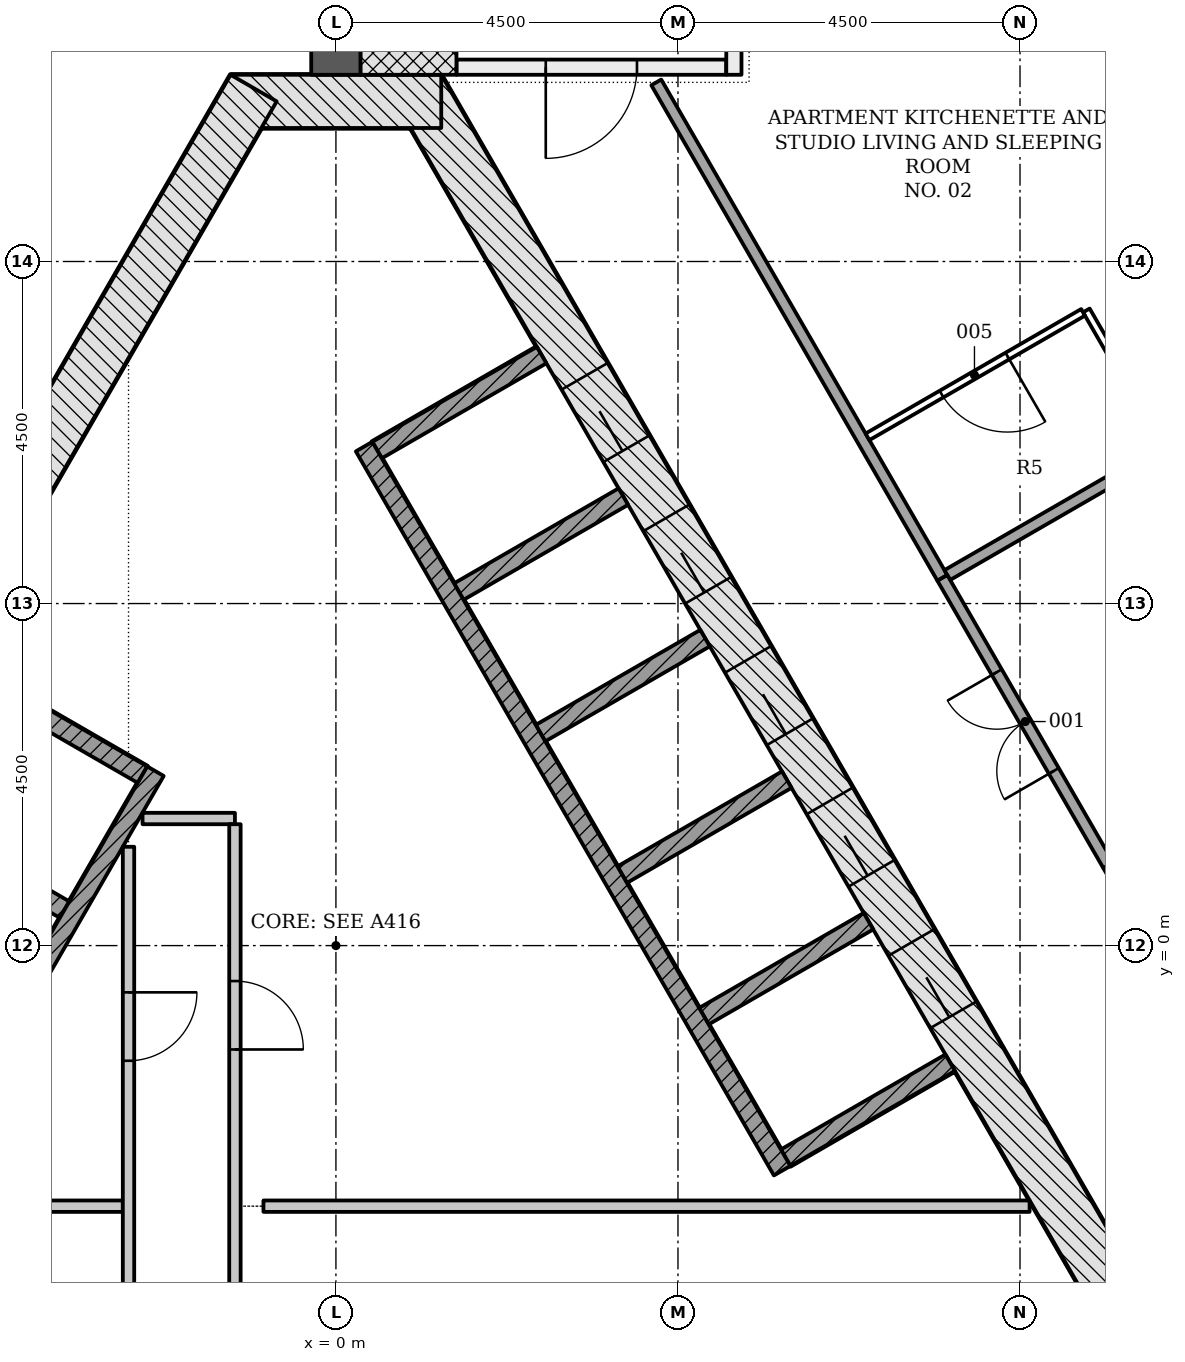
"""IFC4 building model, lengths in metres.
Left out: names, types, materials, properties, quantities, classifications, styles, units other than length and angle.
Written with IfcOpenShell. Run it as: python <this file> out.ifc"""

import sys

from ifc_helpers import new_model, si_unit, direction, frame, frame_2d, origin, place, context, subcontext, project, spatial, rectangle, extrude, element, fill, save


model = new_model("IFC4")
c1 = context("Model", 3, precision=1e-05, world=origin(), true_north=direction((0.0, 1.0)))
c2 = subcontext(c1, "Body", "Model", "MODEL_VIEW")
j1 = project(units=[si_unit("LENGTHUNIT", "METRE"), si_unit("PLANEANGLEUNIT", "RADIAN")], contexts=[c1])
p1 = place(None, origin())
s1 = spatial("IfcSite", under=j1, at=p1, CompositionType="ELEMENT")
p2 = place(p1, origin())
s2 = spatial("IfcBuilding", under=s1, at=p2, CompositionType="ELEMENT")
p3 = place(p2, frame((0.0, 0.0, 214.8)))
s3 = spatial("IfcBuildingStorey", under=s2, at=p3, CompositionType="ELEMENT", Elevation=214.8)
p4 = place(p3, frame((8.926, -6.753, -0.2), z_axis=(0.0, 0.0, 1.0), x_axis=(0.500042739161, 0.866000726912, 0.0)))
e1 = element("IfcWall", 1, at=p4, inside=s3, PredefinedType="SHEAR", context=c2, shape_type="SweptSolid", body=[
    extrude(rectangle(XDim=2.771, YDim=0.7, at=frame_2d((1.386, 0.0))), origin(), (0.0, 0.0, 1.0), 3.6),
])
p5 = place(p3, frame((10.311, -4.703, -0.2), z_axis=(0.0, 0.0, 1.0), x_axis=(-0.500001446645, 0.866024568562, 0.0)))
e2 = element("IfcWall", 2, at=p5, inside=s3, PredefinedType="SHEAR", context=c2, shape_type="SweptSolid", body=[
    extrude(rectangle(XDim=18.458, YDim=0.7, at=frame_2d((9.229, 0.0))), origin(), (0.0, 0.0, 1.0), 3.6),
])
p6 = place(p5, frame((4.379, 0.0, 0.2)))
e3 = element("IfcOpeningElement", 3, at=p6, cuts=e2, PredefinedType="OPENING", context=c2, shape_type="SweptSolid", body=[
    extrude(rectangle(XDim=1.1, YDim=2.1, at=frame_2d((0.55, 1.05))), frame((0.0, 0.36, 0.0), z_axis=(0.0, -1.0, 0.0), x_axis=(1.0, 0.0, 0.0)), (0.0, 0.0, 1.0), 0.72),
])
p7 = place(p5, frame((6.529, 0.0, 0.2)))
e4 = element("IfcOpeningElement", 4, at=p7, cuts=e2, PredefinedType="OPENING", context=c2, shape_type="SweptSolid", body=[
    extrude(rectangle(XDim=1.1, YDim=2.1, at=frame_2d((0.55, 1.05))), frame((0.0, 0.36, 0.0), z_axis=(0.0, -1.0, 0.0), x_axis=(1.0, 0.0, 0.0)), (0.0, 0.0, 1.0), 0.72),
])
p8 = place(p5, frame((8.679, 0.0, 0.2)))
e5 = element("IfcOpeningElement", 5, at=p8, cuts=e2, PredefinedType="OPENING", context=c2, shape_type="SweptSolid", body=[
    extrude(rectangle(XDim=1.1, YDim=2.1, at=frame_2d((0.55, 1.05))), frame((0.0, 0.36, 0.0), z_axis=(0.0, -1.0, 0.0), x_axis=(1.0, 0.0, 0.0)), (0.0, 0.0, 1.0), 0.72),
])
p9 = place(p5, frame((10.829, 0.0, 0.2)))
e6 = element("IfcOpeningElement", 6, at=p9, cuts=e2, PredefinedType="OPENING", context=c2, shape_type="SweptSolid", body=[
    extrude(rectangle(XDim=1.1, YDim=2.1, at=frame_2d((0.55, 1.05))), frame((0.0, 0.36, 0.0), z_axis=(0.0, -1.0, 0.0), x_axis=(1.0, 0.0, 0.0)), (0.0, 0.0, 1.0), 0.72),
])
p10 = place(p5, frame((12.979, 0.0, 0.2)))
e7 = element("IfcOpeningElement", 7, at=p10, cuts=e2, PredefinedType="OPENING", context=c2, shape_type="SweptSolid", body=[
    extrude(rectangle(XDim=1.1, YDim=2.1, at=frame_2d((0.55, 1.05))), frame((0.0, 0.36, 0.0), z_axis=(0.0, -1.0, 0.0), x_axis=(1.0, 0.0, 0.0)), (0.0, 0.0, 1.0), 0.72),
])
p11 = place(p3, frame((1.386, 11.106, -0.2), z_axis=(0.0, 0.0, 1.0), x_axis=(-1.0, 0.0, 0.0)))
e8 = element("IfcWall", 8, at=p11, inside=s3, PredefinedType="SHEAR", context=c2, shape_type="SweptSolid", body=[
    extrude(rectangle(XDim=2.771, YDim=0.7, at=frame_2d((1.386, 0.0))), origin(), (0.0, 0.0, 1.0), 3.6),
])
p12 = place(p3, frame((-1.083, 11.281, -0.2), z_axis=(0.0, 0.0, 1.0), x_axis=(-0.500001446645, -0.866024568562, 0.0)))
e9 = element("IfcWall", 9, at=p12, inside=s3, PredefinedType="SHEAR", context=c2, shape_type="SweptSolid", body=[
    extrude(rectangle(XDim=18.458, YDim=0.7, at=frame_2d((9.229, 0.0))), origin(), (0.0, 0.0, 1.0), 3.6),
])
p13 = place(p12, frame((8.979, 0.0, 0.2)))
e10 = element("IfcOpeningElement", 10, at=p13, cuts=e9, PredefinedType="OPENING", context=c2, shape_type="SweptSolid", body=[
    extrude(rectangle(XDim=1.2, YDim=2.1, at=frame_2d((0.6, 1.05))), frame((0.0, 0.36, 0.0), z_axis=(0.0, -1.0, 0.0), x_axis=(1.0, 0.0, 0.0)), (0.0, 0.0, 1.0), 0.72),
])
p14 = place(p12, frame((11.029, 0.0, 0.2)))
e11 = element("IfcOpeningElement", 11, at=p14, cuts=e9, PredefinedType="OPENING", context=c2, shape_type="SweptSolid", body=[
    extrude(rectangle(XDim=1.2, YDim=2.1, at=frame_2d((0.6, 1.05))), frame((0.0, 0.36, 0.0), z_axis=(0.0, -1.0, 0.0), x_axis=(1.0, 0.0, 0.0)), (0.0, 0.0, 1.0), 0.72),
])
p15 = place(p3, frame((0.0, 11.456, -0.2), z_axis=(0.0, 0.0, 1.0), x_axis=(0.0, 1.0, 0.0)))
e12 = element("IfcWall", 12, at=p15, inside=s3, PredefinedType="SHEAR", context=c2, shape_type="SweptSolid", body=[
    extrude(rectangle(XDim=8.359, YDim=0.65, at=frame_2d((4.179, 0.0))), origin(), (0.0, 0.0, 1.0), 3.6),
])
for number, where, z_axis, x_axis in (
    (13, (8.081, -1.541, -0.2), (0.0, 0.0, 1.0), (-0.866, -0.5, 0.0)),
    (14, (7.006, 0.321, -0.2), (0.0, 0.0, 1.0), (-0.866, -0.5, 0.0)),
):
    element("IfcWall", number, at=place(p3, frame(where, z_axis=z_axis, x_axis=x_axis)), inside=s3, PredefinedType="PARTITIONING", context=c2, shape_type="SweptSolid", body=[
        extrude(rectangle(XDim=2.5, YDim=0.25, at=frame_2d((1.25, 0.0))), origin(), (0.0, 0.0, 1.0), 3.6),
    ])
p16 = place(p3, frame((5.931, 2.183, -0.2), z_axis=(0.0, 0.0, 1.0), x_axis=(-0.866047370643, -0.499961950354, 0.0)))
e15 = element("IfcWall", 15, at=p16, inside=s3, PredefinedType="PARTITIONING", context=c2, shape_type="SweptSolid", body=[
    extrude(rectangle(XDim=2.5, YDim=0.25, at=frame_2d((1.25, 0.0))), origin(), (0.0, 0.0, 1.0), 3.6),
])
for number, where, z_axis, x_axis in (
    (16, (4.856, 4.045, -0.2), (0.0, 0.0, 1.0), (-0.866, -0.5, 0.0)),
    (17, (3.781, 5.907, -0.2), (0.0, 0.0, 1.0), (-0.866, -0.5, 0.0)),
    (18, (2.706, 7.769, -0.2), (0.0, 0.0, 1.0), (-0.866, -0.5, 0.0)),
):
    element("IfcWall", number, at=place(p3, frame(where, z_axis=z_axis, x_axis=x_axis)), inside=s3, PredefinedType="PARTITIONING", context=c2, shape_type="SweptSolid", body=[
        extrude(rectangle(XDim=2.5, YDim=0.25, at=frame_2d((1.25, 0.0))), origin(), (0.0, 0.0, 1.0), 3.6),
    ])
p17 = place(p3, frame((5.87, -2.961, 0.0), z_axis=(0.0, 0.0, 1.0), x_axis=(-0.50000615651, 0.866021849293, 0.0)))
e19 = element("IfcWall", 19, at=p17, inside=s3, PredefinedType="PARTITIONING", context=c2, shape_type="SweptSolid", body=[
    extrude(rectangle(XDim=11.0, YDim=0.25, at=frame_2d((5.5, 0.0))), origin(), (0.0, 0.0, 1.0), 3.4),
])
for number, where, z_axis, x_axis in (
    (20, (-5.056, 3.699, -0.2), (0.0, 0.0, 1.0), (0.866, -0.5, 0.0)),
    (21, (-6.081, 1.923, -0.2), (0.0, 0.0, 1.0), (0.866, -0.5, 0.0)),
):
    element("IfcWall", number, at=place(p3, frame(where, z_axis=z_axis, x_axis=x_axis)), inside=s3, PredefinedType="PARTITIONING", context=c2, shape_type="SweptSolid", body=[
        extrude(rectangle(XDim=2.9, YDim=0.25, at=frame_2d((1.45, 0.0))), origin(), (0.0, 0.0, 1.0), 3.6),
    ])
p18 = place(p3, frame((-2.374, 2.294, 0.0), z_axis=(0.0, 0.0, 1.0), x_axis=(-0.500003174267, -0.866023571113, 0.0)))
e22 = element("IfcWall", 22, at=p18, inside=s3, PredefinedType="PARTITIONING", context=c2, shape_type="SweptSolid", body=[
    extrude(rectangle(XDim=6.7, YDim=0.25, at=frame_2d((3.35, 0.0))), origin(), (0.0, 0.0, 1.0), 3.4),
])
p19 = place(p3, frame((-5.489, -3.428, 0.0), z_axis=(0.0, 0.0, 1.0), x_axis=(1.0, 0.0, 0.0)))
e23 = element("IfcWall", 23, at=p19, inside=s3, PredefinedType="PARTITIONING", context=c2, shape_type="SweptSolid", body=[
    extrude(rectangle(XDim=2.685, YDim=0.15, at=frame_2d((1.343, 0.0))), origin(), (0.0, 0.0, 1.0), 3.4),
])
p20 = place(p3, frame((-2.729, 1.3, 0.0), z_axis=(0.0, 0.0, 1.0), x_axis=(0.0, -1.0, 0.0)))
e24 = element("IfcWall", 24, at=p20, inside=s3, PredefinedType="PARTITIONING", context=c2, shape_type="SweptSolid", body=[
    extrude(rectangle(XDim=7.528, YDim=0.15, at=frame_2d((3.764, 0.0))), origin(), (0.0, 0.0, 1.0), 3.4),
])
p21 = place(p20, frame((1.915, 0.0, 0.0)))
e25 = element("IfcOpeningElement", 25, at=p21, cuts=e24, PredefinedType="OPENING", context=c2, shape_type="SweptSolid", body=[
    extrude(rectangle(XDim=0.9, YDim=2.1, at=frame_2d((0.45, 1.05))), frame((0.0, 0.085, 0.0), z_axis=(0.0, -1.0, 0.0), x_axis=(1.0, 0.0, 0.0)), (0.0, 0.0, 1.0), 0.17),
])
p22 = place(p3, frame((-2.544, 1.672, 0.0), z_axis=(0.0, 0.0, 1.0), x_axis=(1.0, 0.0, 0.0)))
e26 = element("IfcWall", 26, at=p22, inside=s3, PredefinedType="PARTITIONING", context=c2, shape_type="SweptSolid", body=[
    extrude(rectangle(XDim=1.216, YDim=0.15, at=frame_2d((0.608, 0.0))), origin(), (0.0, 0.0, 1.0), 3.4),
])
p23 = place(p3, frame((-1.329, 1.597, 0.0), z_axis=(0.0, 0.0, 1.0), x_axis=(0.0, -1.0, 0.0)))
e27 = element("IfcWall", 27, at=p23, inside=s3, PredefinedType="PARTITIONING", context=c2, shape_type="SweptSolid", body=[
    extrude(rectangle(XDim=7.825, YDim=0.15, at=frame_2d((3.913, 0.0))), origin(), (0.0, 0.0, 1.0), 3.4),
])
p24 = place(p23, frame((2.063, 0.0, 0.0)))
e28 = element("IfcOpeningElement", 28, at=p24, cuts=e27, PredefinedType="OPENING", context=c2, shape_type="SweptSolid", body=[
    extrude(rectangle(XDim=0.9, YDim=2.1, at=frame_2d((0.45, 1.05))), frame((0.0, 0.085, 0.0), z_axis=(0.0, -1.0, 0.0), x_axis=(1.0, 0.0, 0.0)), (0.0, 0.0, 1.0), 0.17),
])
p25 = place(p3, frame((-0.954, -3.428, 0.0), z_axis=(0.0, 0.0, 1.0), x_axis=(1.0, 0.0, 0.0)))
e29 = element("IfcWall", 29, at=p25, inside=s3, PredefinedType="PARTITIONING", context=c2, shape_type="SweptSolid", body=[
    extrude(rectangle(XDim=10.08, YDim=0.15, at=frame_2d((5.04, 0.0))), origin(), (0.0, 0.0, 1.0), 3.4),
])
p26 = place(p3, frame((5.135, 11.556, -0.2), z_axis=(0.0, 0.0, 1.0), x_axis=(-1.0, 0.0, 0.0)))
e30 = element("IfcWall", 30, at=p26, inside=s3, PredefinedType="SHEAR", context=c2, shape_type="SweptSolid", body=[
    extrude(rectangle(XDim=3.55, YDim=0.2, at=frame_2d((1.775, 0.0))), origin(), (0.0, 0.0, 1.0), 3.6),
])
p27 = place(p26, frame((1.175, 0.0, 0.2)))
e31 = element("IfcOpeningElement", 31, at=p27, cuts=e30, PredefinedType="OPENING", context=c2, shape_type="SweptSolid", body=[
    extrude(rectangle(XDim=1.2, YDim=2.1, at=frame_2d((0.6, 1.05))), frame((0.0, 0.11, 0.0), z_axis=(0.0, -1.0, 0.0), x_axis=(1.0, 0.0, 0.0)), (0.0, 0.0, 1.0), 0.22),
])
p28 = place(p3, frame((5.236, 11.456, -0.2), z_axis=(0.0, 0.0, 1.0), x_axis=(0.0, 1.0, 0.0)))
e32 = element("IfcWall", 32, at=p28, inside=s3, PredefinedType="SHEAR", context=c2, shape_type="SweptSolid", body=[
    extrude(rectangle(XDim=5.6, YDim=0.2, at=frame_2d((2.8, 0.0))), origin(), (0.0, 0.0, 1.0), 3.6),
])
p29 = place(p28, frame((0.45, 0.0, 0.2)))
e33 = element("IfcOpeningElement", 33, at=p29, cuts=e32, PredefinedType="OPENING", context=c2, shape_type="SweptSolid", body=[
    extrude(rectangle(XDim=1.2, YDim=2.1, at=frame_2d((0.6, 1.05))), frame((0.0, 0.11, 0.0), z_axis=(0.0, -1.0, 0.0), x_axis=(1.0, 0.0, 0.0)), (0.0, 0.0, 1.0), 0.22),
])
p30 = place(p3, frame((0.955, 11.456, -0.2), z_axis=(0.0, 0.0, 1.0), x_axis=(0.0, 1.0, 0.0)))
e34 = element("IfcWall", 34, at=p30, inside=s3, PredefinedType="SHEAR", context=c2, shape_type="SweptSolid", body=[
    extrude(rectangle(XDim=7.2, YDim=1.261, at=frame_2d((3.6, 0.0))), origin(), (0.0, 0.0, 1.0), 3.6),
])
p31 = place(p3, frame((15.832, -8.765, 0.0), z_axis=(0.0, 0.0, 1.0), x_axis=(-0.500005035328, 0.866022496617, 0.0)))
e35 = element("IfcWall", 35, at=p31, inside=s3, PredefinedType="PARTITIONING", context=c2, shape_type="SweptSolid", body=[
    extrude(rectangle(XDim=11.343, YDim=0.15, at=frame_2d((5.671, 0.0))), origin(), (0.0, 0.0, 1.0), 2.852),
])
p32 = place(p3, frame((7.979, 4.837, 0.0), z_axis=(0.0, 0.0, 1.0), x_axis=(-0.500014427086, 0.866017074142, 0.0)))
e36 = element("IfcWall", 36, at=p32, inside=s3, PredefinedType="PARTITIONING", context=c2, shape_type="SweptSolid", body=[
    extrude(rectangle(XDim=7.528, YDim=0.15, at=frame_2d((3.764, 0.0))), origin(), (0.0, 0.0, 1.0), 2.852),
])
p33 = place(p3, frame((12.707, 7.567, 0.0), z_axis=(0.0, 0.0, 1.0), x_axis=(-0.866016468327, -0.500015476347, 0.0)))
e37 = element("IfcWall", 37, at=p33, inside=s3, PredefinedType="PARTITIONING", context=c2, shape_type="SweptSolid", body=[
    extrude(rectangle(XDim=5.385, YDim=0.15, at=frame_2d((2.692, 0.0))), origin(), (0.0, 0.0, 1.0), 3.4),
])
p34 = place(p33, frame((0.53, 0.0, 0.0)))
e38 = element("IfcOpeningElement", 38, at=p34, cuts=e37, PredefinedType="OPENING", context=c2, shape_type="SweptSolid", body=[
    extrude(rectangle(XDim=1.0, YDim=2.1, at=frame_2d((0.5, 1.05))), frame((0.0, 0.085, 0.0), z_axis=(0.0, -1.0, 0.0), x_axis=(1.0, 0.0, 0.0)), (0.0, 0.0, 1.0), 0.17),
])
p35 = place(p3, frame((10.161, 1.058, 0.0), z_axis=(0.0, 0.0, 1.0), x_axis=(-0.499977476193, 0.86603840752, 0.0)))
e39 = element("IfcWall", 39, at=p35, inside=s3, PredefinedType="PARTITIONING", context=c2, shape_type="SweptSolid", body=[
    extrude(rectangle(XDim=4.365, YDim=0.15, at=frame_2d((2.182, 0.0))), origin(), (0.0, 0.0, 1.0), 2.852),
])
p36 = place(p35, frame((1.432, 0.0, 0.0)))
e40 = element("IfcOpeningElement", 40, at=p36, cuts=e39, PredefinedType="OPENING", context=c2, shape_type="SweptSolid", body=[
    extrude(rectangle(XDim=1.5, YDim=2.1, at=frame_2d((0.75, 1.05))), frame((0.0, 0.085, 0.0), z_axis=(0.0, -1.0, 0.0), x_axis=(1.0, 0.0, 0.0)), (0.0, 0.0, 1.0), 0.17),
])
p37 = place(p3, frame((10.885, 6.602, 0.0), z_axis=(0.0, 0.0, 1.0), x_axis=(-0.499990325971, 0.866030989016, 0.0)))
e41 = element("IfcWall", 41, at=p37, inside=s3, PredefinedType="PARTITIONING", context=c2, shape_type="SweptSolid", body=[
    extrude(rectangle(XDim=2.025, YDim=0.1, at=frame_2d((1.012, 0.0))), origin(), (0.0, 0.0, 1.0), 3.4),
])
p38 = place(p3, frame((9.83, 8.331, 0.0), z_axis=(0.0, 0.0, 1.0), x_axis=(-0.865995643347, -0.500051543047, 0.0)))
e42 = element("IfcWall", 42, at=p38, inside=s3, PredefinedType="PARTITIONING", context=c2, shape_type="SweptSolid", body=[
    extrude(rectangle(XDim=3.275, YDim=0.1, at=frame_2d((1.638, 0.0))), origin(), (0.0, 0.0, 1.0), 3.4),
])
p39 = place(p38, frame((1.15, 0.0, 0.0)))
e43 = element("IfcOpeningElement", 43, at=p39, cuts=e42, PredefinedType="OPENING", context=c2, shape_type="SweptSolid", body=[
    extrude(rectangle(XDim=1.0, YDim=2.1, at=frame_2d((0.5, 1.05))), frame((0.0, 0.06, 0.0), z_axis=(0.0, -1.0, 0.0), x_axis=(1.0, 0.0, 0.0)), (0.0, 0.0, 1.0), 0.12),
])
p40 = place(p3, frame((-0.325, 18.894, 0.0), z_axis=(0.0, 0.0, 1.0), x_axis=(-0.50000126085, -0.866024675831, 0.0)))
e44 = element("IfcWall", 44, at=p40, inside=s3, PredefinedType="PARTITIONING", context=c2, shape_type="SweptSolid", body=[
    extrude(rectangle(XDim=12.027, YDim=0.15, at=frame_2d((6.013, 0.0))), origin(), (0.0, 0.0, 1.0), 2.852),
])
p41 = place(p6, origin())
e45 = element("IfcDoor", 45, at=p41, inside=s3, OperationType="DOUBLE_DOOR_SLIDING", PredefinedType="DOOR", context=c2, shape_type="SweptSolid", body=[
    extrude(rectangle(XDim=1.1, YDim=2.1, at=frame_2d((0.55, 1.05))), frame((0.0, 0.025, 0.0), z_axis=(0.0, -1.0, 0.0), x_axis=(1.0, 0.0, 0.0)), (0.0, 0.0, 1.0), 0.05),
])
fill(e3, e45)
p42 = place(p7, origin())
e46 = element("IfcDoor", 46, at=p42, inside=s3, OperationType="DOUBLE_DOOR_SLIDING", PredefinedType="DOOR", context=c2, shape_type="SweptSolid", body=[
    extrude(rectangle(XDim=1.1, YDim=2.1, at=frame_2d((0.55, 1.05))), frame((0.0, 0.025, 0.0), z_axis=(0.0, -1.0, 0.0), x_axis=(1.0, 0.0, 0.0)), (0.0, 0.0, 1.0), 0.05),
])
fill(e4, e46)
p43 = place(p8, origin())
e47 = element("IfcDoor", 47, at=p43, inside=s3, OperationType="DOUBLE_DOOR_SLIDING", PredefinedType="DOOR", context=c2, shape_type="SweptSolid", body=[
    extrude(rectangle(XDim=1.1, YDim=2.1, at=frame_2d((0.55, 1.05))), frame((0.0, 0.025, 0.0), z_axis=(0.0, -1.0, 0.0), x_axis=(1.0, 0.0, 0.0)), (0.0, 0.0, 1.0), 0.05),
])
fill(e5, e47)
p44 = place(p9, origin())
e48 = element("IfcDoor", 48, at=p44, inside=s3, OperationType="DOUBLE_DOOR_SLIDING", PredefinedType="DOOR", context=c2, shape_type="SweptSolid", body=[
    extrude(rectangle(XDim=1.1, YDim=2.1, at=frame_2d((0.55, 1.05))), frame((0.0, 0.025, 0.0), z_axis=(0.0, -1.0, 0.0), x_axis=(1.0, 0.0, 0.0)), (0.0, 0.0, 1.0), 0.05),
])
fill(e6, e48)
p45 = place(p10, origin())
e49 = element("IfcDoor", 49, at=p45, inside=s3, OperationType="DOUBLE_DOOR_SLIDING", PredefinedType="DOOR", context=c2, shape_type="SweptSolid", body=[
    extrude(rectangle(XDim=1.1, YDim=2.1, at=frame_2d((0.55, 1.05))), frame((0.0, 0.025, 0.0), z_axis=(0.0, -1.0, 0.0), x_axis=(1.0, 0.0, 0.0)), (0.0, 0.0, 1.0), 0.05),
])
fill(e7, e49)
p46 = place(p21, origin())
e50 = element("IfcDoor", 50, at=p46, inside=s3, OperationType="SINGLE_SWING_LEFT", PredefinedType="DOOR", context=c2, shape_type="SweptSolid", body=[
    extrude(rectangle(XDim=0.9, YDim=2.1, at=frame_2d((0.45, 1.05))), frame((0.0, 0.025, 0.0), z_axis=(0.0, -1.0, 0.0), x_axis=(1.0, 0.0, 0.0)), (0.0, 0.0, 1.0), 0.05),
])
fill(e25, e50)
p47 = place(p24, origin())
e51 = element("IfcDoor", 51, at=p47, inside=s3, OperationType="SINGLE_SWING_RIGHT", PredefinedType="DOOR", context=c2, shape_type="SweptSolid", body=[
    extrude(rectangle(XDim=0.9, YDim=2.1, at=frame_2d((0.45, 1.05))), frame((0.0, 0.025, 0.0), z_axis=(0.0, -1.0, 0.0), x_axis=(1.0, 0.0, 0.0)), (0.0, 0.0, 1.0), 0.05),
])
fill(e28, e51)
p48 = place(p27, origin())
e52 = element("IfcDoor", 52, at=p48, inside=s3, OperationType="SINGLE_SWING_RIGHT", PredefinedType="DOOR", context=c2, shape_type="SweptSolid", body=[
    extrude(rectangle(XDim=1.2, YDim=2.1, at=frame_2d((0.6, 1.05))), frame((0.0, 0.025, 0.0), z_axis=(0.0, -1.0, 0.0), x_axis=(1.0, 0.0, 0.0)), (0.0, 0.0, 1.0), 0.05),
])
fill(e31, e52)
p49 = place(p36, origin())
e53 = element("IfcDoor", 53, at=p49, inside=s3, OperationType="DOUBLE_DOOR_SINGLE_SWING", PredefinedType="DOOR", context=c2, shape_type="SweptSolid", body=[
    extrude(rectangle(XDim=1.5, YDim=2.1, at=frame_2d((0.75, 1.05))), frame((0.0, 0.025, 0.0), z_axis=(0.0, -1.0, 0.0), x_axis=(1.0, 0.0, 0.0)), (0.0, 0.0, 1.0), 0.05),
])
fill(e40, e53)
p50 = place(p39, origin())
e54 = element("IfcDoor", 54, at=p50, inside=s3, OperationType="SINGLE_SWING_LEFT", PredefinedType="DOOR", context=c2, shape_type="SweptSolid", body=[
    extrude(rectangle(XDim=1.0, YDim=2.1, at=frame_2d((0.5, 1.05))), frame((0.0, 0.025, 0.0), z_axis=(0.0, -1.0, 0.0), x_axis=(1.0, 0.0, 0.0)), (0.0, 0.0, 1.0), 0.05),
])
fill(e43, e54)
save(model, sys.argv[1])
